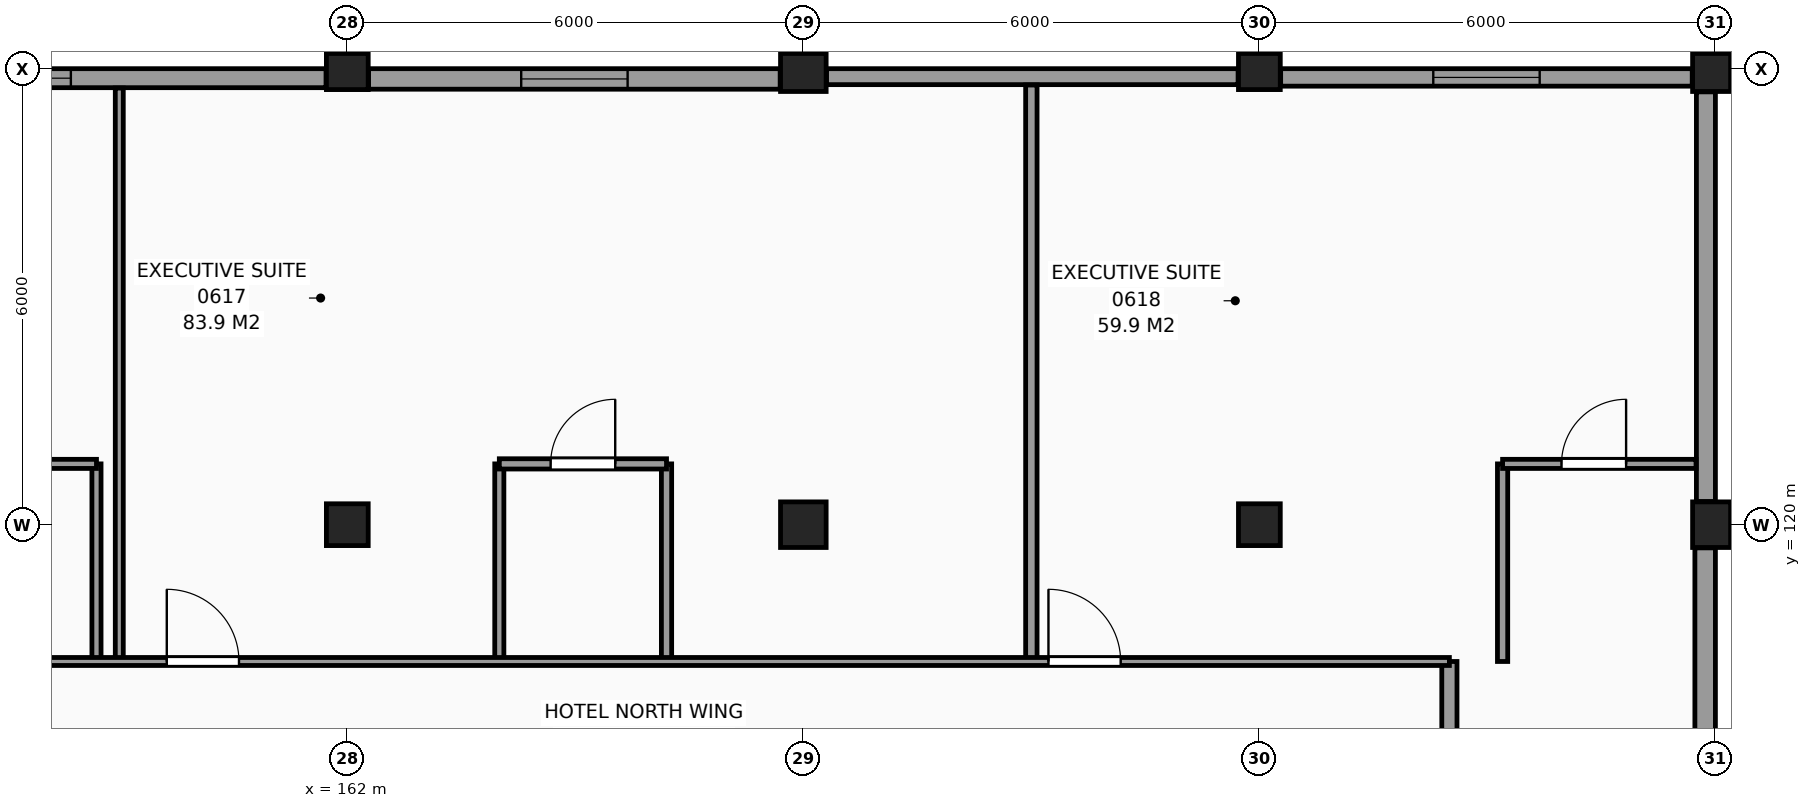
"""IFC4 building model, lengths in metres.
Left out: names, types, materials, properties, quantities, classifications, styles, units other than length and angle.
Written with IfcOpenShell. Run it as: python <this file> out.ifc"""

import sys

from ifc_helpers import new_model, si_unit, direction, frame, frame_2d, origin, origin_2d, place, context, subcontext, project, spatial, rectangle, extrude, element, fill, save


model = new_model("IFC4")
c1 = context("Model", 3, precision=1e-05, world=origin(), true_north=direction((0.0, 1.0)))
c2 = subcontext(c1, "Body", "Model", "MODEL_VIEW")
j1 = project(units=[si_unit("LENGTHUNIT", "METRE"), si_unit("PLANEANGLEUNIT", "RADIAN")], contexts=[c1])
p1 = place(None, origin())
s1 = spatial("IfcSite", under=j1, at=p1, CompositionType="ELEMENT")
p2 = place(p1, origin())
s2 = spatial("IfcBuilding", under=s1, at=p2, CompositionType="ELEMENT")
p3 = place(p2, frame((0.0, 0.0, 28.2)))
s3 = spatial("IfcBuildingStorey", under=s2, at=p3, CompositionType="ELEMENT", Elevation=28.2)
for number, where, z_axis, x_axis in (
    (1, (162.0, 120.0, 0.0), (0.0, 0.0, 1.0), (1.0, 0.0, 0.0)),
    (2, (162.0, 126.0, 0.0), (0.0, 0.0, 1.0), (1.0, 0.0, 0.0)),
):
    element("IfcColumn", number, at=place(p3, frame(where, z_axis=z_axis, x_axis=x_axis)), inside=s3, PredefinedType="COLUMN", context=c2, shape_type="SweptSolid", body=[
        extrude(rectangle(XDim=0.55, YDim=0.55, at=origin_2d()), origin(), (0.0, 0.0, 1.0), 3.3),
    ])
for number, where, z_axis, x_axis in (
    (3, (168.0, 120.0, 0.0), (0.0, 0.0, 1.0), (1.0, 0.0, 0.0)),
    (4, (168.0, 126.0, 0.0), (0.0, 0.0, 1.0), (1.0, 0.0, 0.0)),
):
    element("IfcColumn", number, at=place(p3, frame(where, z_axis=z_axis, x_axis=x_axis)), inside=s3, PredefinedType="COLUMN", context=c2, shape_type="SweptSolid", body=[
        extrude(rectangle(XDim=0.6, YDim=0.6, at=origin_2d()), origin(), (0.0, 0.0, 1.0), 3.3),
    ])
for number, where, z_axis, x_axis in (
    (5, (174.0, 120.0, 0.0), (0.0, 0.0, 1.0), (1.0, 0.0, 0.0)),
    (6, (174.0, 126.0, 0.0), (0.0, 0.0, 1.0), (1.0, 0.0, 0.0)),
):
    element("IfcColumn", number, at=place(p3, frame(where, z_axis=z_axis, x_axis=x_axis)), inside=s3, PredefinedType="COLUMN", context=c2, shape_type="SweptSolid", body=[
        extrude(rectangle(XDim=0.55, YDim=0.55, at=origin_2d()), origin(), (0.0, 0.0, 1.0), 3.3),
    ])
for number, where, z_axis, x_axis in (
    (7, (180.0, 120.0, 0.0), (0.0, 0.0, 1.0), (1.0, 0.0, 0.0)),
    (8, (180.0, 126.0, 0.0), (0.0, 0.0, 1.0), (1.0, 0.0, 0.0)),
):
    element("IfcColumn", number, at=place(p3, frame(where, z_axis=z_axis, x_axis=x_axis)), inside=s3, PredefinedType="COLUMN", context=c2, shape_type="SweptSolid", body=[
        extrude(rectangle(XDim=0.6, YDim=0.6, at=origin_2d()), origin(), (0.0, 0.0, 1.0), 3.3),
    ])
p4 = place(p3, frame((179.865, 114.305, 0.0), z_axis=(0.0, 0.0, 1.0), x_axis=(0.0, 1.0, 0.0)))
e9 = element("IfcWall", 9, at=p4, inside=s3, PredefinedType="SOLIDWALL", context=c2, shape_type="SweptSolid", body=[
    extrude(rectangle(XDim=5.39, YDim=0.27, at=frame_2d((2.695, 0.0))), origin(), (0.0, 0.0, 1.0), 2.43),
])
p5 = place(p3, frame((179.875, 120.305, 0.0), z_axis=(0.0, 0.0, 1.0), x_axis=(0.0, 1.0, 0.0)))
e10 = element("IfcWall", 10, at=p5, inside=s3, PredefinedType="SOLIDWALL", context=c2, shape_type="SweptSolid", body=[
    extrude(rectangle(XDim=5.39, YDim=0.25, at=frame_2d((2.695, 0.0))), origin(), (0.0, 0.0, 1.0), 2.43),
])
p6 = place(p3, frame((179.695, 125.885, 0.0), z_axis=(0.0, 0.0, 1.0), x_axis=(-1.0, 0.0, 0.0)))
e11 = element("IfcWall", 11, at=p6, inside=s3, PredefinedType="SOLIDWALL", context=c2, shape_type="SweptSolid", body=[
    extrude(rectangle(XDim=5.415, YDim=0.23, at=frame_2d((2.708, 0.0))), origin(), (0.0, 0.0, 1.0), 2.43),
])
p7 = place(p6, frame((2.007, 0.0, 0.8)))
e12 = element("IfcOpeningElement", 12, at=p7, cuts=e11, PredefinedType="OPENING", context=c2, shape_type="SweptSolid", body=[
    extrude(rectangle(XDim=1.4, YDim=1.4, at=frame_2d((0.7, 0.7))), frame((0.0, 0.125, 0.0), z_axis=(0.0, -1.0, 0.0), x_axis=(1.0, 0.0, 0.0)), (0.0, 0.0, 1.0), 0.25),
])
p8 = place(p3, frame((173.72, 125.895, 0.0), z_axis=(0.0, 0.0, 1.0), x_axis=(-1.0, 0.0, 0.0)))
e13 = element("IfcWall", 13, at=p8, inside=s3, PredefinedType="SOLIDWALL", context=c2, shape_type="SweptSolid", body=[
    extrude(rectangle(XDim=5.415, YDim=0.21, at=frame_2d((2.708, 0.0))), origin(), (0.0, 0.0, 1.0), 2.43),
])
p9 = place(p3, frame((167.695, 125.865, 0.0), z_axis=(0.0, 0.0, 1.0), x_axis=(-1.0, 0.0, 0.0)))
e14 = element("IfcWall", 14, at=p9, inside=s3, PredefinedType="SOLIDWALL", context=c2, shape_type="SweptSolid", body=[
    extrude(rectangle(XDim=5.415, YDim=0.27, at=frame_2d((2.708, 0.0))), origin(), (0.0, 0.0, 1.0), 2.43),
])
p10 = place(p9, frame((2.007, 0.0, 0.8)))
e15 = element("IfcOpeningElement", 15, at=p10, cuts=e14, PredefinedType="OPENING", context=c2, shape_type="SweptSolid", body=[
    extrude(rectangle(XDim=1.4, YDim=1.4, at=frame_2d((0.7, 0.7))), frame((0.0, 0.145, 0.0), z_axis=(0.0, -1.0, 0.0), x_axis=(1.0, 0.0, 0.0)), (0.0, 0.0, 1.0), 0.29),
])
p11 = place(p3, frame((161.72, 125.875, 0.0), z_axis=(0.0, 0.0, 1.0), x_axis=(-1.0, 0.0, 0.0)))
e16 = element("IfcWall", 16, at=p11, inside=s3, PredefinedType="SOLIDWALL", context=c2, shape_type="SweptSolid", body=[
    extrude(rectangle(XDim=5.415, YDim=0.25, at=frame_2d((2.708, 0.0))), origin(), (0.0, 0.0, 1.0), 2.43),
])
p12 = place(p11, frame((3.357, 0.0, 0.8)))
e17 = element("IfcOpeningElement", 17, at=p12, cuts=e16, PredefinedType="OPENING", context=c2, shape_type="SweptSolid", body=[
    extrude(rectangle(XDim=1.4, YDim=1.4, at=frame_2d((0.7, 0.7))), frame((0.0, 0.135, 0.0), z_axis=(0.0, -1.0, 0.0), x_axis=(1.0, 0.0, 0.0)), (0.0, 0.0, 1.0), 0.27),
])
p13 = place(p3, frame((158.7, 118.2, 0.0), z_axis=(0.0, 0.0, 1.0), x_axis=(0.0, 1.0, 0.0)))
e18 = element("IfcWall", 18, at=p13, inside=s3, PredefinedType="PARTITIONING", context=c2, shape_type="SweptSolid", body=[
    extrude(rectangle(XDim=2.6, YDim=0.12, at=frame_2d((1.3, 0.0))), origin(), (0.0, 0.0, 1.0), 3.08),
])
p14 = place(p3, frame((159.0, 118.2, 0.0), z_axis=(0.0, 0.0, 1.0), x_axis=(0.0, 1.0, 0.0)))
e19 = element("IfcWall", 19, at=p14, inside=s3, PredefinedType="PARTITIONING", context=c2, shape_type="SweptSolid", body=[
    extrude(rectangle(XDim=7.545, YDim=0.105, at=frame_2d((3.772, 0.0))), origin(), (0.0, 0.0, 1.0), 3.08),
])
p15 = place(p3, frame((164.0, 118.2, 0.0), z_axis=(0.0, 0.0, 1.0), x_axis=(0.0, 1.0, 0.0)))
e20 = element("IfcWall", 20, at=p15, inside=s3, PredefinedType="PARTITIONING", context=c2, shape_type="SweptSolid", body=[
    extrude(rectangle(XDim=2.6, YDim=0.12, at=frame_2d((1.3, 0.0))), origin(), (0.0, 0.0, 1.0), 3.08),
])
p16 = place(p3, frame((166.2, 118.2, 0.0), z_axis=(0.0, 0.0, 1.0), x_axis=(0.0, 1.0, 0.0)))
e21 = element("IfcWall", 21, at=p16, inside=s3, PredefinedType="PARTITIONING", context=c2, shape_type="SweptSolid", body=[
    extrude(rectangle(XDim=2.6, YDim=0.135, at=frame_2d((1.3, 0.0))), origin(), (0.0, 0.0, 1.0), 3.08),
])
p17 = place(p3, frame((171.0, 118.2, 0.0), z_axis=(0.0, 0.0, 1.0), x_axis=(0.0, 1.0, 0.0)))
e22 = element("IfcWall", 22, at=p17, inside=s3, PredefinedType="PARTITIONING", context=c2, shape_type="SweptSolid", body=[
    extrude(rectangle(XDim=7.585, YDim=0.15, at=frame_2d((3.792, 0.0))), origin(), (0.0, 0.0, 1.0), 3.08),
])
p18 = place(p3, frame((176.5, 115.8, 0.0), z_axis=(0.0, 0.0, 1.0), x_axis=(0.0, 1.0, 0.0)))
e23 = element("IfcWall", 23, at=p18, inside=s3, PredefinedType="PARTITIONING", context=c2, shape_type="SweptSolid", body=[
    extrude(rectangle(XDim=2.4, YDim=0.2, at=frame_2d((1.2, 0.0))), origin(), (0.0, 0.0, 1.0), 3.08),
])
p19 = place(p3, frame((177.2, 118.2, 0.0), z_axis=(0.0, 0.0, 1.0), x_axis=(0.0, 1.0, 0.0)))
e24 = element("IfcWall", 24, at=p19, inside=s3, PredefinedType="PARTITIONING", context=c2, shape_type="SweptSolid", body=[
    extrude(rectangle(XDim=2.6, YDim=0.135, at=frame_2d((1.3, 0.0))), origin(), (0.0, 0.0, 1.0), 3.08),
])
p20 = place(p3, frame((66.235, 118.2, 0.0), z_axis=(0.0, 0.0, 1.0), x_axis=(1.0, 0.0, 0.0)))
e25 = element("IfcWall", 25, at=p20, inside=s3, PredefinedType="PARTITIONING", context=c2, shape_type="SweptSolid", body=[
    extrude(rectangle(XDim=110.265, YDim=0.105, at=frame_2d((55.132, 0.0))), origin(), (0.0, 0.0, 1.0), 3.08),
])
p21 = place(p20, frame((0.49, 0.0, 0.0)))
e26 = element("IfcOpeningElement", 26, at=p21, cuts=e25, PredefinedType="OPENING", context=c2, shape_type="SweptSolid", body=[
    extrude(rectangle(XDim=0.95, YDim=2.1, at=frame_2d((0.475, 1.05))), frame((0.0, 0.062, 0.0), z_axis=(0.0, -1.0, 0.0), x_axis=(1.0, 0.0, 0.0)), (0.0, 0.0, 1.0), 0.125),
])
p22 = place(p20, frame((4.89, 0.0, 0.0)))
e27 = element("IfcOpeningElement", 27, at=p22, cuts=e25, PredefinedType="OPENING", context=c2, shape_type="SweptSolid", body=[
    extrude(rectangle(XDim=0.95, YDim=2.1, at=frame_2d((0.475, 1.05))), frame((0.0, 0.062, 0.0), z_axis=(0.0, -1.0, 0.0), x_axis=(1.0, 0.0, 0.0)), (0.0, 0.0, 1.0), 0.125),
])
p23 = place(p20, frame((9.39, 0.0, 0.0)))
e28 = element("IfcOpeningElement", 28, at=p23, cuts=e25, PredefinedType="OPENING", context=c2, shape_type="SweptSolid", body=[
    extrude(rectangle(XDim=0.95, YDim=2.1, at=frame_2d((0.475, 1.05))), frame((0.0, 0.062, 0.0), z_axis=(0.0, -1.0, 0.0), x_axis=(1.0, 0.0, 0.0)), (0.0, 0.0, 1.0), 0.125),
])
p24 = place(p20, frame((24.09, 0.0, 0.0)))
e29 = element("IfcOpeningElement", 29, at=p24, cuts=e25, PredefinedType="OPENING", context=c2, shape_type="SweptSolid", body=[
    extrude(rectangle(XDim=0.95, YDim=2.1, at=frame_2d((0.475, 1.05))), frame((0.0, 0.062, 0.0), z_axis=(0.0, -1.0, 0.0), x_axis=(1.0, 0.0, 0.0)), (0.0, 0.0, 1.0), 0.125),
])
p25 = place(p20, frame((32.34, 0.0, 0.0)))
e30 = element("IfcOpeningElement", 30, at=p25, cuts=e25, PredefinedType="OPENING", context=c2, shape_type="SweptSolid", body=[
    extrude(rectangle(XDim=0.95, YDim=2.1, at=frame_2d((0.475, 1.05))), frame((0.0, 0.062, 0.0), z_axis=(0.0, -1.0, 0.0), x_axis=(1.0, 0.0, 0.0)), (0.0, 0.0, 1.0), 0.125),
])
p26 = place(p20, frame((34.89, 0.0, 0.0)))
e31 = element("IfcOpeningElement", 31, at=p26, cuts=e25, PredefinedType="OPENING", context=c2, shape_type="SweptSolid", body=[
    extrude(rectangle(XDim=0.95, YDim=2.1, at=frame_2d((0.475, 1.05))), frame((0.0, 0.062, 0.0), z_axis=(0.0, -1.0, 0.0), x_axis=(1.0, 0.0, 0.0)), (0.0, 0.0, 1.0), 0.125),
])
p27 = place(p20, frame((42.09, 0.0, 0.0)))
e32 = element("IfcOpeningElement", 32, at=p27, cuts=e25, PredefinedType="OPENING", context=c2, shape_type="SweptSolid", body=[
    extrude(rectangle(XDim=0.95, YDim=2.1, at=frame_2d((0.475, 1.05))), frame((0.0, 0.062, 0.0), z_axis=(0.0, -1.0, 0.0), x_axis=(1.0, 0.0, 0.0)), (0.0, 0.0, 1.0), 0.125),
])
p28 = place(p20, frame((46.29, 0.0, 0.0)))
e33 = element("IfcOpeningElement", 33, at=p28, cuts=e25, PredefinedType="OPENING", context=c2, shape_type="SweptSolid", body=[
    extrude(rectangle(XDim=0.95, YDim=2.1, at=frame_2d((0.475, 1.05))), frame((0.0, 0.062, 0.0), z_axis=(0.0, -1.0, 0.0), x_axis=(1.0, 0.0, 0.0)), (0.0, 0.0, 1.0), 0.125),
])
p29 = place(p20, frame((48.49, 0.0, 0.0)))
e34 = element("IfcOpeningElement", 34, at=p29, cuts=e25, PredefinedType="OPENING", context=c2, shape_type="SweptSolid", body=[
    extrude(rectangle(XDim=0.95, YDim=2.1, at=frame_2d((0.475, 1.05))), frame((0.0, 0.062, 0.0), z_axis=(0.0, -1.0, 0.0), x_axis=(1.0, 0.0, 0.0)), (0.0, 0.0, 1.0), 0.125),
])
p30 = place(p20, frame((54.49, 0.0, 0.0)))
e35 = element("IfcOpeningElement", 35, at=p30, cuts=e25, PredefinedType="OPENING", context=c2, shape_type="SweptSolid", body=[
    extrude(rectangle(XDim=0.95, YDim=2.1, at=frame_2d((0.475, 1.05))), frame((0.0, 0.062, 0.0), z_axis=(0.0, -1.0, 0.0), x_axis=(1.0, 0.0, 0.0)), (0.0, 0.0, 1.0), 0.125),
])
p31 = place(p20, frame((64.29, 0.0, 0.0)))
e36 = element("IfcOpeningElement", 36, at=p31, cuts=e25, PredefinedType="OPENING", context=c2, shape_type="SweptSolid", body=[
    extrude(rectangle(XDim=0.95, YDim=2.1, at=frame_2d((0.475, 1.05))), frame((0.0, 0.062, 0.0), z_axis=(0.0, -1.0, 0.0), x_axis=(1.0, 0.0, 0.0)), (0.0, 0.0, 1.0), 0.125),
])
p32 = place(p20, frame((66.49, 0.0, 0.0)))
e37 = element("IfcOpeningElement", 37, at=p32, cuts=e25, PredefinedType="OPENING", context=c2, shape_type="SweptSolid", body=[
    extrude(rectangle(XDim=0.95, YDim=2.1, at=frame_2d((0.475, 1.05))), frame((0.0, 0.062, 0.0), z_axis=(0.0, -1.0, 0.0), x_axis=(1.0, 0.0, 0.0)), (0.0, 0.0, 1.0), 0.125),
])
p33 = place(p20, frame((70.89, 0.0, 0.0)))
e38 = element("IfcOpeningElement", 38, at=p33, cuts=e25, PredefinedType="OPENING", context=c2, shape_type="SweptSolid", body=[
    extrude(rectangle(XDim=0.95, YDim=2.1, at=frame_2d((0.475, 1.05))), frame((0.0, 0.062, 0.0), z_axis=(0.0, -1.0, 0.0), x_axis=(1.0, 0.0, 0.0)), (0.0, 0.0, 1.0), 0.125),
])
p34 = place(p20, frame((78.09, 0.0, 0.0)))
e39 = element("IfcOpeningElement", 39, at=p34, cuts=e25, PredefinedType="OPENING", context=c2, shape_type="SweptSolid", body=[
    extrude(rectangle(XDim=0.95, YDim=2.1, at=frame_2d((0.475, 1.05))), frame((0.0, 0.062, 0.0), z_axis=(0.0, -1.0, 0.0), x_axis=(1.0, 0.0, 0.0)), (0.0, 0.0, 1.0), 0.125),
])
p35 = place(p20, frame((86.34, 0.0, 0.0)))
e40 = element("IfcOpeningElement", 40, at=p35, cuts=e25, PredefinedType="OPENING", context=c2, shape_type="SweptSolid", body=[
    extrude(rectangle(XDim=0.95, YDim=2.1, at=frame_2d((0.475, 1.05))), frame((0.0, 0.062, 0.0), z_axis=(0.0, -1.0, 0.0), x_axis=(1.0, 0.0, 0.0)), (0.0, 0.0, 1.0), 0.125),
])
p36 = place(p20, frame((88.89, 0.0, 0.0)))
e41 = element("IfcOpeningElement", 41, at=p36, cuts=e25, PredefinedType="OPENING", context=c2, shape_type="SweptSolid", body=[
    extrude(rectangle(XDim=0.95, YDim=2.1, at=frame_2d((0.475, 1.05))), frame((0.0, 0.062, 0.0), z_axis=(0.0, -1.0, 0.0), x_axis=(1.0, 0.0, 0.0)), (0.0, 0.0, 1.0), 0.125),
])
p37 = place(p20, frame((93.39, 0.0, 0.0)))
e42 = element("IfcOpeningElement", 42, at=p37, cuts=e25, PredefinedType="OPENING", context=c2, shape_type="SweptSolid", body=[
    extrude(rectangle(XDim=0.95, YDim=2.1, at=frame_2d((0.475, 1.05))), frame((0.0, 0.062, 0.0), z_axis=(0.0, -1.0, 0.0), x_axis=(1.0, 0.0, 0.0)), (0.0, 0.0, 1.0), 0.125),
])
p38 = place(p20, frame((104.99, 0.0, 0.0)))
e43 = element("IfcOpeningElement", 43, at=p38, cuts=e25, PredefinedType="OPENING", context=c2, shape_type="SweptSolid", body=[
    extrude(rectangle(XDim=0.95, YDim=2.1, at=frame_2d((0.475, 1.05))), frame((0.0, 0.062, 0.0), z_axis=(0.0, -1.0, 0.0), x_axis=(1.0, 0.0, 0.0)), (0.0, 0.0, 1.0), 0.125),
])
p39 = place(p3, frame((156.5, 120.8, 0.0), z_axis=(0.0, 0.0, 1.0), x_axis=(1.0, 0.0, 0.0)))
e44 = element("IfcWall", 44, at=p39, inside=s3, PredefinedType="PARTITIONING", context=c2, shape_type="SweptSolid", body=[
    extrude(rectangle(XDim=2.2, YDim=0.12, at=frame_2d((1.1, 0.0))), origin(), (0.0, 0.0, 1.0), 3.08),
])
p40 = place(p39, frame((0.675, 0.0, 0.0)))
e45 = element("IfcOpeningElement", 45, at=p40, cuts=e44, PredefinedType="OPENING", context=c2, shape_type="SweptSolid", body=[
    extrude(rectangle(XDim=0.85, YDim=2.1, at=frame_2d((0.425, 1.05))), frame((0.0, 0.07, 0.0), z_axis=(0.0, -1.0, 0.0), x_axis=(1.0, 0.0, 0.0)), (0.0, 0.0, 1.0), 0.14),
])
p41 = place(p3, frame((164.0, 120.8, 0.0), z_axis=(0.0, 0.0, 1.0), x_axis=(1.0, 0.0, 0.0)))
e46 = element("IfcWall", 46, at=p41, inside=s3, PredefinedType="PARTITIONING", context=c2, shape_type="SweptSolid", body=[
    extrude(rectangle(XDim=2.2, YDim=0.135, at=frame_2d((1.1, 0.0))), origin(), (0.0, 0.0, 1.0), 3.08),
])
p42 = place(p41, frame((0.675, 0.0, 0.0)))
e47 = element("IfcOpeningElement", 47, at=p42, cuts=e46, PredefinedType="OPENING", context=c2, shape_type="SweptSolid", body=[
    extrude(rectangle(XDim=0.85, YDim=2.1, at=frame_2d((0.425, 1.05))), frame((0.0, 0.078, 0.0), z_axis=(0.0, -1.0, 0.0), x_axis=(1.0, 0.0, 0.0)), (0.0, 0.0, 1.0), 0.155),
])
p43 = place(p3, frame((177.2, 120.8, 0.0), z_axis=(0.0, 0.0, 1.0), x_axis=(1.0, 0.0, 0.0)))
e48 = element("IfcWall", 48, at=p43, inside=s3, PredefinedType="PARTITIONING", context=c2, shape_type="SweptSolid", body=[
    extrude(rectangle(XDim=2.545, YDim=0.12, at=frame_2d((1.272, 0.0))), origin(), (0.0, 0.0, 1.0), 3.08),
])
p44 = place(p43, frame((0.775, 0.0, 0.0)))
e49 = element("IfcOpeningElement", 49, at=p44, cuts=e48, PredefinedType="OPENING", context=c2, shape_type="SweptSolid", body=[
    extrude(rectangle(XDim=0.85, YDim=2.1, at=frame_2d((0.425, 1.05))), frame((0.0, 0.07, 0.0), z_axis=(0.0, -1.0, 0.0), x_axis=(1.0, 0.0, 0.0)), (0.0, 0.0, 1.0), 0.14),
])
p45 = place(p12, origin())
e50 = element("IfcWindow", 50, at=p45, inside=s3, PartitioningType="SINGLE_PANEL", PredefinedType="WINDOW", context=c2, shape_type="SweptSolid", body=[
    extrude(rectangle(XDim=1.4, YDim=1.4, at=frame_2d((0.7, 0.7))), frame((0.0, 0.03, 0.0), z_axis=(0.0, -1.0, 0.0), x_axis=(1.0, 0.0, 0.0)), (0.0, 0.0, 1.0), 0.06),
])
fill(e17, e50)
p46 = place(p10, origin())
e51 = element("IfcWindow", 51, at=p46, inside=s3, PartitioningType="SINGLE_PANEL", PredefinedType="WINDOW", context=c2, shape_type="SweptSolid", body=[
    extrude(rectangle(XDim=1.4, YDim=1.4, at=frame_2d((0.7, 0.7))), frame((0.0, 0.03, 0.0), z_axis=(0.0, -1.0, 0.0), x_axis=(1.0, 0.0, 0.0)), (0.0, 0.0, 1.0), 0.06),
])
fill(e15, e51)
p47 = place(p7, origin())
e52 = element("IfcWindow", 52, at=p47, inside=s3, PartitioningType="SINGLE_PANEL", PredefinedType="WINDOW", context=c2, shape_type="SweptSolid", body=[
    extrude(rectangle(XDim=1.4, YDim=1.4, at=frame_2d((0.7, 0.7))), frame((0.0, 0.03, 0.0), z_axis=(0.0, -1.0, 0.0), x_axis=(1.0, 0.0, 0.0)), (0.0, 0.0, 1.0), 0.06),
])
fill(e12, e52)
p48 = place(p42, origin())
e53 = element("IfcDoor", 53, at=p48, inside=s3, OperationType="SINGLE_SWING_RIGHT", PredefinedType="DOOR", context=c2, shape_type="SweptSolid", body=[
    extrude(rectangle(XDim=0.85, YDim=2.1, at=frame_2d((0.425, 1.05))), frame((0.0, 0.025, 0.0), z_axis=(0.0, -1.0, 0.0), x_axis=(1.0, 0.0, 0.0)), (0.0, 0.0, 1.0), 0.05),
])
fill(e47, e53)
p49 = place(p37, origin())
e54 = element("IfcDoor", 54, at=p49, inside=s3, OperationType="SINGLE_SWING_LEFT", PredefinedType="DOOR", context=c2, shape_type="SweptSolid", body=[
    extrude(rectangle(XDim=0.95, YDim=2.1, at=frame_2d((0.475, 1.05))), frame((0.0, 0.025, 0.0), z_axis=(0.0, -1.0, 0.0), x_axis=(1.0, 0.0, 0.0)), (0.0, 0.0, 1.0), 0.05),
])
fill(e42, e54)
p50 = place(p44, origin())
e55 = element("IfcDoor", 55, at=p50, inside=s3, OperationType="SINGLE_SWING_RIGHT", PredefinedType="DOOR", context=c2, shape_type="SweptSolid", body=[
    extrude(rectangle(XDim=0.85, YDim=2.1, at=frame_2d((0.425, 1.05))), frame((0.0, 0.025, 0.0), z_axis=(0.0, -1.0, 0.0), x_axis=(1.0, 0.0, 0.0)), (0.0, 0.0, 1.0), 0.05),
])
fill(e49, e55)
p51 = place(p38, origin())
e56 = element("IfcDoor", 56, at=p51, inside=s3, OperationType="SINGLE_SWING_LEFT", PredefinedType="DOOR", context=c2, shape_type="SweptSolid", body=[
    extrude(rectangle(XDim=0.95, YDim=2.1, at=frame_2d((0.475, 1.05))), frame((0.0, 0.025, 0.0), z_axis=(0.0, -1.0, 0.0), x_axis=(1.0, 0.0, 0.0)), (0.0, 0.0, 1.0), 0.05),
])
fill(e43, e56)
save(model, sys.argv[1])
